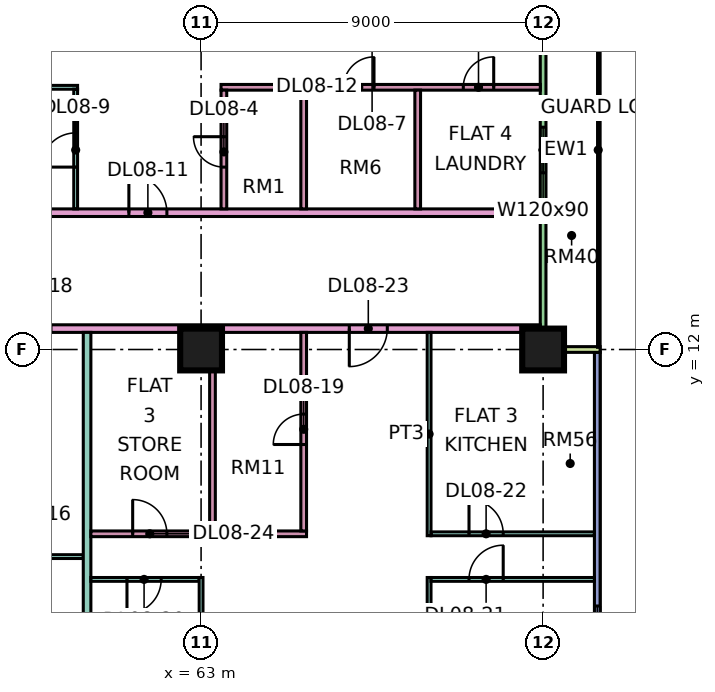
"""IFC4 building model, lengths in metres.
Left out: names, types, materials, properties, quantities, classifications, styles, units other than length and angle.
Written with IfcOpenShell. Run it as: python <this file> out.ifc"""

import sys

from ifc_helpers import new_model, si_unit, direction, frame, frame_2d, origin, origin_2d, place, context, subcontext, project, spatial, rectangle, extrude, element, fill, save


model = new_model("IFC4")
c1 = context("Model", 3, precision=1e-05, world=origin(), true_north=direction((0.0, 1.0)))
c2 = subcontext(c1, "Body", "Model", "MODEL_VIEW")
j1 = project(units=[si_unit("LENGTHUNIT", "METRE"), si_unit("PLANEANGLEUNIT", "RADIAN")], contexts=[c1])
p1 = place(None, origin())
s1 = spatial("IfcSite", under=j1, at=p1, CompositionType="ELEMENT")
p2 = place(p1, origin())
s2 = spatial("IfcBuilding", under=s1, at=p2, CompositionType="ELEMENT")
p3 = place(p2, frame((0.0, 0.0, 45.15)))
s3 = spatial("IfcBuildingStorey", under=s2, at=p3, CompositionType="ELEMENT", Elevation=45.15)
for number, where, z_axis, x_axis in (
    (1, (63.0, 12.0, 0.0), (0.0, 0.0, 1.0), (1.0, 0.0, 0.0)),
    (2, (72.0, 12.0, 0.0), (0.0, 0.0, 1.0), (1.0, 0.0, 0.0)),
):
    element("IfcColumn", number, at=place(p3, frame(where, z_axis=z_axis, x_axis=x_axis)), inside=s3, PredefinedType="COLUMN", context=c2, shape_type="SweptSolid", body=[
        extrude(rectangle(XDim=1.1, YDim=1.1, at=origin_2d()), origin(), (0.0, 0.0, 1.0), 3.75),
    ])
p4 = place(p3, frame((73.425, 1.5, 0.0), z_axis=(0.0, 0.0, 1.0), x_axis=(0.0, 1.0, 0.0)))
e3 = element("IfcWall", 3, at=p4, inside=s3, PredefinedType="SOLIDWALL", context=c2, shape_type="SweptSolid", body=[
    extrude(rectangle(XDim=10.425, YDim=0.15, at=frame_2d((5.212, 0.0))), origin(), (0.0, 0.0, 1.0), 3.35),
])
p5 = place(p4, frame((0.75, 0.0, 0.45)))
e4 = element("IfcOpeningElement", 4, at=p5, cuts=e3, PredefinedType="OPENING", context=c2, shape_type="SweptSolid", body=[
    extrude(rectangle(XDim=3.0, YDim=2.4, at=frame_2d((1.5, 1.2))), frame((0.0, 0.085, 0.0), z_axis=(0.0, -1.0, 0.0), x_axis=(1.0, 0.0, 0.0)), (0.0, 0.0, 1.0), 0.17),
])
p6 = place(p3, frame((72.0, 12.075, 0.0), z_axis=(0.0, 0.0, 1.0), x_axis=(0.0, 1.0, 0.0)))
e5 = element("IfcWall", 5, at=p6, inside=s3, PredefinedType="SOLIDWALL", context=c2, shape_type="SweptSolid", body=[
    extrude(rectangle(XDim=10.35, YDim=0.15, at=frame_2d((5.175, 0.0))), origin(), (0.0, 0.0, 1.0), 3.35),
])
p7 = place(p6, frame((4.575, 0.0, 1.7)))
e6 = element("IfcOpeningElement", 6, at=p7, cuts=e5, PredefinedType="OPENING", context=c2, shape_type="SweptSolid", body=[
    extrude(rectangle(XDim=1.2, YDim=0.9, at=frame_2d((0.6, 0.45))), frame((0.0, 0.085, 0.0), z_axis=(0.0, -1.0, 0.0), x_axis=(1.0, 0.0, 0.0)), (0.0, 0.0, 1.0), 0.17),
])
p8 = place(p6, frame((8.587, 0.0, 0.45)))
e7 = element("IfcOpeningElement", 7, at=p8, cuts=e5, PredefinedType="OPENING", context=c2, shape_type="SweptSolid", body=[
    extrude(rectangle(XDim=1.2, YDim=2.4, at=frame_2d((0.6, 1.2))), frame((0.0, 0.085, 0.0), z_axis=(0.0, -1.0, 0.0), x_axis=(1.0, 0.0, 0.0)), (0.0, 0.0, 1.0), 0.17),
])
p9 = place(p3, frame((73.5, 12.0, 0.0), z_axis=(0.0, 0.0, 1.0), x_axis=(-1.0, 0.0, 0.0)))
e8 = element("IfcWall", 8, at=p9, inside=s3, PredefinedType="SOLIDWALL", context=c2, shape_type="SweptSolid", body=[
    extrude(rectangle(XDim=1.5, YDim=0.15, at=frame_2d((0.75, 0.0))), origin(), (0.0, 0.0, 1.0), 3.35),
])
p10 = place(p3, frame((40.65, 12.55, 0.0), z_axis=(0.0, 0.0, 1.0), x_axis=(1.0, 0.0, 0.0)))
e9 = element("IfcWall", 9, at=p10, inside=s3, PredefinedType="PARTITIONING", context=c2, shape_type="SweptSolid", body=[
    extrude(rectangle(XDim=31.276, YDim=0.2, at=frame_2d((15.638, 0.0))), origin(), (0.0, 0.0, 1.0), 3.35),
])
p11 = place(p10, frame((17.4, 0.0, 0.0)))
e10 = element("IfcOpeningElement", 10, at=p11, cuts=e9, PredefinedType="OPENING", context=c2, shape_type="SweptSolid", body=[
    extrude(rectangle(XDim=1.0, YDim=2.1, at=frame_2d((0.5, 1.05))), frame((0.0, 0.11, 0.0), z_axis=(0.0, -1.0, 0.0), x_axis=(1.0, 0.0, 0.0)), (0.0, 0.0, 1.0), 0.22),
])
p12 = place(p10, frame((26.25, 0.0, 0.0)))
e11 = element("IfcOpeningElement", 11, at=p12, cuts=e9, PredefinedType="OPENING", context=c2, shape_type="SweptSolid", body=[
    extrude(rectangle(XDim=1.0, YDim=2.1, at=frame_2d((0.5, 1.05))), frame((0.0, 0.11, 0.0), z_axis=(0.0, -1.0, 0.0), x_axis=(1.0, 0.0, 0.0)), (0.0, 0.0, 1.0), 0.22),
])
p13 = place(p10, frame((1.05, 0.0, 0.0)))
e12 = element("IfcOpeningElement", 12, at=p13, cuts=e9, PredefinedType="OPENING", context=c2, shape_type="SweptSolid", body=[
    extrude(rectangle(XDim=1.0, YDim=2.1, at=frame_2d((0.5, 1.05))), frame((0.0, 0.11, 0.0), z_axis=(0.0, -1.0, 0.0), x_axis=(1.0, 0.0, 0.0)), (0.0, 0.0, 1.0), 0.22),
])
p14 = place(p3, frame((51.225, 15.6, 0.0), z_axis=(0.0, 0.0, 1.0), x_axis=(1.0, 0.0, 0.0)))
e13 = element("IfcWall", 13, at=p14, inside=s3, PredefinedType="PARTITIONING", context=c2, shape_type="SweptSolid", body=[
    extrude(rectangle(XDim=20.701, YDim=0.2, at=frame_2d((10.351, 0.0))), origin(), (0.0, 0.0, 1.0), 3.35),
])
p15 = place(p14, frame((9.875, 0.0, 0.0)))
e14 = element("IfcOpeningElement", 14, at=p15, cuts=e13, PredefinedType="OPENING", context=c2, shape_type="SweptSolid", body=[
    extrude(rectangle(XDim=1.0, YDim=2.1, at=frame_2d((0.5, 1.05))), frame((0.0, 0.11, 0.0), z_axis=(0.0, -1.0, 0.0), x_axis=(1.0, 0.0, 0.0)), (0.0, 0.0, 1.0), 0.22),
])
p16 = place(p14, frame((0.875, 0.0, 0.0)))
e15 = element("IfcOpeningElement", 15, at=p16, cuts=e13, PredefinedType="OPENING", context=c2, shape_type="SweptSolid", body=[
    extrude(rectangle(XDim=1.0, YDim=2.1, at=frame_2d((0.5, 1.05))), frame((0.0, 0.11, 0.0), z_axis=(0.0, -1.0, 0.0), x_axis=(1.0, 0.0, 0.0)), (0.0, 0.0, 1.0), 0.22),
])
p17 = place(p3, frame((54.05, 6.55, 0.0), z_axis=(0.0, 0.0, 1.0), x_axis=(1.0, 0.0, 0.0)))
e16 = element("IfcWall", 16, at=p17, inside=s3, PredefinedType="PARTITIONING", context=c2, shape_type="SweptSolid", body=[
    extrude(rectangle(XDim=5.85, YDim=0.1, at=frame_2d((2.925, 0.0))), origin(), (0.0, 0.0, 1.0), 3.35),
])
p18 = place(p17, frame((1.0, 0.0, 0.0)))
e17 = element("IfcOpeningElement", 17, at=p18, cuts=e16, PredefinedType="OPENING", context=c2, shape_type="SweptSolid", body=[
    extrude(rectangle(XDim=0.9, YDim=2.1, at=frame_2d((0.45, 1.05))), frame((0.0, 0.06, 0.0), z_axis=(0.0, -1.0, 0.0), x_axis=(1.0, 0.0, 0.0)), (0.0, 0.0, 1.0), 0.12),
])
p19 = place(p17, frame((4.0, 0.0, 0.0)))
e18 = element("IfcOpeningElement", 18, at=p19, cuts=e16, PredefinedType="OPENING", context=c2, shape_type="SweptSolid", body=[
    extrude(rectangle(XDim=0.9, YDim=2.1, at=frame_2d((0.45, 1.05))), frame((0.0, 0.06, 0.0), z_axis=(0.0, -1.0, 0.0), x_axis=(1.0, 0.0, 0.0)), (0.0, 0.0, 1.0), 0.12),
])
p20 = place(p3, frame((54.1, 18.9, 0.0), z_axis=(0.0, 0.0, 1.0), x_axis=(1.0, 0.0, 0.0)))
e19 = element("IfcWall", 19, at=p20, inside=s3, PredefinedType="PARTITIONING", context=c2, shape_type="SweptSolid", body=[
    extrude(rectangle(XDim=5.65, YDim=0.1, at=frame_2d((2.825, 0.0))), origin(), (0.0, 0.0, 1.0), 3.35),
])
p21 = place(p3, frame((59.7, 15.7, 0.0), z_axis=(0.0, 0.0, 1.0), x_axis=(0.0, 1.0, 0.0)))
e20 = element("IfcWall", 20, at=p21, inside=s3, PredefinedType="PARTITIONING", context=c2, shape_type="SweptSolid", body=[
    extrude(rectangle(XDim=3.15, YDim=0.1, at=frame_2d((1.575, 0.0))), origin(), (0.0, 0.0, 1.0), 3.35),
])
p22 = place(p21, frame((1.1, 0.0, 0.0)))
e21 = element("IfcOpeningElement", 21, at=p22, cuts=e20, PredefinedType="OPENING", context=c2, shape_type="SweptSolid", body=[
    extrude(rectangle(XDim=0.9, YDim=2.1, at=frame_2d((0.45, 1.05))), frame((0.0, 0.06, 0.0), z_axis=(0.0, -1.0, 0.0), x_axis=(1.0, 0.0, 0.0)), (0.0, 0.0, 1.0), 0.12),
])
p23 = place(p3, frame((60.0, 0.0, 0.0), z_axis=(0.0, 0.0, 1.0), x_axis=(0.0, 1.0, 0.0)))
e22 = element("IfcWall", 22, at=p23, inside=s3, PredefinedType="PARTITIONING", context=c2, shape_type="SweptSolid", body=[
    extrude(rectangle(XDim=12.45, YDim=0.2, at=frame_2d((6.225, 0.0))), origin(), (0.0, 0.0, 1.0), 3.35),
])
p24 = place(p3, frame((60.1, 5.95, 0.0), z_axis=(0.0, 0.0, 1.0), x_axis=(1.0, 0.0, 0.0)))
e23 = element("IfcWall", 23, at=p24, inside=s3, PredefinedType="PARTITIONING", context=c2, shape_type="SweptSolid", body=[
    extrude(rectangle(XDim=2.85, YDim=0.1, at=frame_2d((1.425, 0.0))), origin(), (0.0, 0.0, 1.0), 3.35),
])
p25 = place(p24, frame((0.95, 0.0, 0.0)))
e24 = element("IfcOpeningElement", 24, at=p25, cuts=e23, PredefinedType="OPENING", context=c2, shape_type="SweptSolid", body=[
    extrude(rectangle(XDim=0.9, YDim=2.1, at=frame_2d((0.45, 1.05))), frame((0.0, 0.06, 0.0), z_axis=(0.0, -1.0, 0.0), x_axis=(1.0, 0.0, 0.0)), (0.0, 0.0, 1.0), 0.12),
])
p26 = place(p3, frame((60.1, 7.15, 0.0), z_axis=(0.0, 0.0, 1.0), x_axis=(1.0, 0.0, 0.0)))
e25 = element("IfcWall", 25, at=p26, inside=s3, PredefinedType="PARTITIONING", context=c2, shape_type="SweptSolid", body=[
    extrude(rectangle(XDim=5.675, YDim=0.15, at=frame_2d((2.837, 0.0))), origin(), (0.0, 0.0, 1.0), 3.35),
])
p27 = place(p26, frame((1.1, 0.0, 0.0)))
e26 = element("IfcOpeningElement", 26, at=p27, cuts=e25, PredefinedType="OPENING", context=c2, shape_type="SweptSolid", body=[
    extrude(rectangle(XDim=0.9, YDim=2.1, at=frame_2d((0.45, 1.05))), frame((0.0, 0.085, 0.0), z_axis=(0.0, -1.0, 0.0), x_axis=(1.0, 0.0, 0.0)), (0.0, 0.0, 1.0), 0.17),
])
p28 = place(p3, frame((63.0, 0.074, 0.0), z_axis=(0.0, 0.0, 1.0), x_axis=(0.0, 1.0, 0.0)))
e27 = element("IfcWall", 27, at=p28, inside=s3, PredefinedType="PARTITIONING", context=c2, shape_type="SweptSolid", body=[
    extrude(rectangle(XDim=5.926, YDim=0.1, at=frame_2d((2.963, 0.0))), origin(), (0.0, 0.0, 1.0), 3.35),
])
p29 = place(p3, frame((63.3, 7.225, 0.0), z_axis=(0.0, 0.0, 1.0), x_axis=(0.0, 1.0, 0.0)))
e28 = element("IfcWall", 28, at=p29, inside=s3, PredefinedType="PARTITIONING", context=c2, shape_type="SweptSolid", body=[
    extrude(rectangle(XDim=5.225, YDim=0.15, at=frame_2d((2.612, 0.0))), origin(), (0.0, 0.0, 1.0), 3.35),
])
p30 = place(p3, frame((63.525, 18.9, 0.0), z_axis=(0.0, 0.0, 1.0), x_axis=(1.0, 0.0, 0.0)))
e29 = element("IfcWall", 29, at=p30, inside=s3, PredefinedType="PARTITIONING", context=c2, shape_type="SweptSolid", body=[
    extrude(rectangle(XDim=8.401, YDim=0.15, at=frame_2d((4.201, 0.0))), origin(), (0.0, 0.0, 1.0), 3.35),
])
p31 = place(p30, frame((6.375, 0.0, 0.0)))
e30 = element("IfcOpeningElement", 30, at=p31, cuts=e29, PredefinedType="OPENING", context=c2, shape_type="SweptSolid", body=[
    extrude(rectangle(XDim=0.8, YDim=2.1, at=frame_2d((0.4, 1.05))), frame((0.0, 0.085, 0.0), z_axis=(0.0, -1.0, 0.0), x_axis=(1.0, 0.0, 0.0)), (0.0, 0.0, 1.0), 0.17),
])
p32 = place(p30, frame((3.225, 0.0, 0.0)))
e31 = element("IfcOpeningElement", 31, at=p32, cuts=e29, PredefinedType="OPENING", context=c2, shape_type="SweptSolid", body=[
    extrude(rectangle(XDim=0.8, YDim=2.1, at=frame_2d((0.4, 1.05))), frame((0.0, 0.085, 0.0), z_axis=(0.0, -1.0, 0.0), x_axis=(1.0, 0.0, 0.0)), (0.0, 0.0, 1.0), 0.17),
])
p33 = place(p3, frame((63.6, 15.7, 0.0), z_axis=(0.0, 0.0, 1.0), x_axis=(0.0, 1.0, 0.0)))
e32 = element("IfcWall", 32, at=p33, inside=s3, PredefinedType="PARTITIONING", context=c2, shape_type="SweptSolid", body=[
    extrude(rectangle(XDim=3.125, YDim=0.15, at=frame_2d((1.562, 0.0))), origin(), (0.0, 0.0, 1.0), 3.35),
])
p34 = place(p33, frame((1.1, 0.0, 0.0)))
e33 = element("IfcOpeningElement", 33, at=p34, cuts=e32, PredefinedType="OPENING", context=c2, shape_type="SweptSolid", body=[
    extrude(rectangle(XDim=0.8, YDim=2.1, at=frame_2d((0.4, 1.05))), frame((0.0, 0.085, 0.0), z_axis=(0.0, -1.0, 0.0), x_axis=(1.0, 0.0, 0.0)), (0.0, 0.0, 1.0), 0.17),
])
p35 = place(p3, frame((65.7, 7.225, 0.0), z_axis=(0.0, 0.0, 1.0), x_axis=(0.0, 1.0, 0.0)))
e34 = element("IfcWall", 34, at=p35, inside=s3, PredefinedType="PARTITIONING", context=c2, shape_type="SweptSolid", body=[
    extrude(rectangle(XDim=5.225, YDim=0.15, at=frame_2d((2.612, 0.0))), origin(), (0.0, 0.0, 1.0), 3.35),
])
p36 = place(p35, frame((2.275, 0.0, 0.0)))
e35 = element("IfcOpeningElement", 35, at=p36, cuts=e34, PredefinedType="OPENING", context=c2, shape_type="SweptSolid", body=[
    extrude(rectangle(XDim=0.8, YDim=2.1, at=frame_2d((0.4, 1.05))), frame((0.0, 0.085, 0.0), z_axis=(0.0, -1.0, 0.0), x_axis=(1.0, 0.0, 0.0)), (0.0, 0.0, 1.0), 0.17),
])
for number, where, z_axis, x_axis in (
    (36, (65.7, 15.7, 0.0), (0.0, 0.0, 1.0), (0.0, 1.0, 0.0)),
    (37, (68.7, 15.7, 0.0), (0.0, 0.0, 1.0), (0.0, 1.0, 0.0)),
):
    element("IfcWall", number, at=place(p3, frame(where, z_axis=z_axis, x_axis=x_axis)), inside=s3, PredefinedType="PARTITIONING", context=c2, shape_type="SweptSolid", body=[
        extrude(rectangle(XDim=3.125, YDim=0.15, at=frame_2d((1.562, 0.0))), origin(), (0.0, 0.0, 1.0), 3.35),
    ])
p37 = place(p3, frame((69.0, 0.074, 0.0), z_axis=(0.0, 0.0, 1.0), x_axis=(0.0, 1.0, 0.0)))
e38 = element("IfcWall", 38, at=p37, inside=s3, PredefinedType="PARTITIONING", context=c2, shape_type="SweptSolid", body=[
    extrude(rectangle(XDim=5.926, YDim=0.1, at=frame_2d((2.963, 0.0))), origin(), (0.0, 0.0, 1.0), 3.35),
])
p38 = place(p3, frame((69.0, 7.1, 0.0), z_axis=(0.0, 0.0, 1.0), x_axis=(0.0, 1.0, 0.0)))
e39 = element("IfcWall", 39, at=p38, inside=s3, PredefinedType="PARTITIONING", context=c2, shape_type="SweptSolid", body=[
    extrude(rectangle(XDim=5.35, YDim=0.1, at=frame_2d((2.675, 0.0))), origin(), (0.0, 0.0, 1.0), 3.35),
])
p39 = place(p3, frame((69.05, 5.95, 0.0), z_axis=(0.0, 0.0, 1.0), x_axis=(1.0, 0.0, 0.0)))
e40 = element("IfcWall", 40, at=p39, inside=s3, PredefinedType="PARTITIONING", context=c2, shape_type="SweptSolid", body=[
    extrude(rectangle(XDim=4.3, YDim=0.1, at=frame_2d((2.15, 0.0))), origin(), (0.0, 0.0, 1.0), 3.35),
])
p40 = place(p39, frame((1.0, 0.0, 0.0)))
e41 = element("IfcOpeningElement", 41, at=p40, cuts=e40, PredefinedType="OPENING", context=c2, shape_type="SweptSolid", body=[
    extrude(rectangle(XDim=0.9, YDim=2.1, at=frame_2d((0.45, 1.05))), frame((0.0, 0.06, 0.0), z_axis=(0.0, -1.0, 0.0), x_axis=(1.0, 0.0, 0.0)), (0.0, 0.0, 1.0), 0.12),
])
p41 = place(p3, frame((69.05, 7.15, 0.0), z_axis=(0.0, 0.0, 1.0), x_axis=(1.0, 0.0, 0.0)))
e42 = element("IfcWall", 42, at=p41, inside=s3, PredefinedType="PARTITIONING", context=c2, shape_type="SweptSolid", body=[
    extrude(rectangle(XDim=4.3, YDim=0.1, at=frame_2d((2.15, 0.0))), origin(), (0.0, 0.0, 1.0), 3.35),
])
p42 = place(p41, frame((1.0, 0.0, 0.0)))
e43 = element("IfcOpeningElement", 43, at=p42, cuts=e42, PredefinedType="OPENING", context=c2, shape_type="SweptSolid", body=[
    extrude(rectangle(XDim=0.9, YDim=2.1, at=frame_2d((0.45, 1.05))), frame((0.0, 0.06, 0.0), z_axis=(0.0, -1.0, 0.0), x_axis=(1.0, 0.0, 0.0)), (0.0, 0.0, 1.0), 0.12),
])
p43 = place(p5, origin())
e44 = element("IfcWindow", 44, at=p43, inside=s3, PartitioningType="SINGLE_PANEL", PredefinedType="WINDOW", context=c2, shape_type="SweptSolid", body=[
    extrude(rectangle(XDim=3.0, YDim=2.4, at=frame_2d((1.5, 1.2))), frame((0.0, 0.03, 0.0), z_axis=(0.0, -1.0, 0.0), x_axis=(1.0, 0.0, 0.0)), (0.0, 0.0, 1.0), 0.06),
])
fill(e4, e44)
p44 = place(p7, origin())
e45 = element("IfcWindow", 45, at=p44, inside=s3, PartitioningType="SINGLE_PANEL", PredefinedType="WINDOW", context=c2, shape_type="SweptSolid", body=[
    extrude(rectangle(XDim=1.2, YDim=0.9, at=frame_2d((0.6, 0.45))), frame((0.0, 0.03, 0.0), z_axis=(0.0, -1.0, 0.0), x_axis=(1.0, 0.0, 0.0)), (0.0, 0.0, 1.0), 0.06),
])
fill(e6, e45)
p45 = place(p34, frame((0.8, 0.0, 0.0), z_axis=(0.0, 0.0, 1.0), x_axis=(-1.0, 0.0, 0.0)))
e46 = element("IfcDoor", 46, at=p45, inside=s3, OperationType="SINGLE_SWING_RIGHT", PredefinedType="DOOR", context=c2, shape_type="SweptSolid", body=[
    extrude(rectangle(XDim=0.8, YDim=2.1, at=frame_2d((0.4, 1.05))), frame((0.0, 0.025, 0.0), z_axis=(0.0, -1.0, 0.0), x_axis=(1.0, 0.0, 0.0)), (0.0, 0.0, 1.0), 0.05),
])
fill(e33, e46)
p46 = place(p22, origin())
e47 = element("IfcDoor", 47, at=p46, inside=s3, OperationType="SINGLE_SWING_LEFT", PredefinedType="DOOR", context=c2, shape_type="SweptSolid", body=[
    extrude(rectangle(XDim=0.9, YDim=2.1, at=frame_2d((0.45, 1.05))), frame((0.0, 0.025, 0.0), z_axis=(0.0, -1.0, 0.0), x_axis=(1.0, 0.0, 0.0)), (0.0, 0.0, 1.0), 0.05),
])
fill(e21, e47)
p47 = place(p31, frame((0.8, 0.0, 0.0), z_axis=(0.0, 0.0, 1.0), x_axis=(-1.0, 0.0, 0.0)))
e48 = element("IfcDoor", 48, at=p47, inside=s3, OperationType="SINGLE_SWING_RIGHT", PredefinedType="DOOR", context=c2, shape_type="SweptSolid", body=[
    extrude(rectangle(XDim=0.8, YDim=2.1, at=frame_2d((0.4, 1.05))), frame((0.0, 0.025, 0.0), z_axis=(0.0, -1.0, 0.0), x_axis=(1.0, 0.0, 0.0)), (0.0, 0.0, 1.0), 0.05),
])
fill(e30, e48)
p48 = place(p15, origin())
e49 = element("IfcDoor", 49, at=p48, inside=s3, OperationType="SINGLE_SWING_LEFT", PredefinedType="DOOR", context=c2, shape_type="SweptSolid", body=[
    extrude(rectangle(XDim=1.0, YDim=2.1, at=frame_2d((0.5, 1.05))), frame((0.0, 0.025, 0.0), z_axis=(0.0, -1.0, 0.0), x_axis=(1.0, 0.0, 0.0)), (0.0, 0.0, 1.0), 0.05),
])
fill(e14, e49)
p49 = place(p32, frame((0.8, 0.0, 0.0), z_axis=(0.0, 0.0, 1.0), x_axis=(-1.0, 0.0, 0.0)))
e50 = element("IfcDoor", 50, at=p49, inside=s3, OperationType="SINGLE_SWING_RIGHT", PredefinedType="DOOR", context=c2, shape_type="SweptSolid", body=[
    extrude(rectangle(XDim=0.8, YDim=2.1, at=frame_2d((0.4, 1.05))), frame((0.0, 0.025, 0.0), z_axis=(0.0, -1.0, 0.0), x_axis=(1.0, 0.0, 0.0)), (0.0, 0.0, 1.0), 0.05),
])
fill(e31, e50)
p50 = place(p36, origin())
e51 = element("IfcDoor", 51, at=p50, inside=s3, OperationType="SINGLE_SWING_LEFT", PredefinedType="DOOR", context=c2, shape_type="SweptSolid", body=[
    extrude(rectangle(XDim=0.8, YDim=2.1, at=frame_2d((0.4, 1.05))), frame((0.0, 0.025, 0.0), z_axis=(0.0, -1.0, 0.0), x_axis=(1.0, 0.0, 0.0)), (0.0, 0.0, 1.0), 0.05),
])
fill(e35, e51)
p51 = place(p25, frame((0.9, 0.0, 0.0), z_axis=(0.0, 0.0, 1.0), x_axis=(-1.0, 0.0, 0.0)))
e52 = element("IfcDoor", 52, at=p51, inside=s3, OperationType="SINGLE_SWING_LEFT", PredefinedType="DOOR", context=c2, shape_type="SweptSolid", body=[
    extrude(rectangle(XDim=0.9, YDim=2.1, at=frame_2d((0.45, 1.05))), frame((0.0, 0.025, 0.0), z_axis=(0.0, -1.0, 0.0), x_axis=(1.0, 0.0, 0.0)), (0.0, 0.0, 1.0), 0.05),
])
fill(e24, e52)
p52 = place(p40, frame((0.9, 0.0, 0.0), z_axis=(0.0, 0.0, 1.0), x_axis=(-1.0, 0.0, 0.0)))
e53 = element("IfcDoor", 53, at=p52, inside=s3, OperationType="SINGLE_SWING_RIGHT", PredefinedType="DOOR", context=c2, shape_type="SweptSolid", body=[
    extrude(rectangle(XDim=0.9, YDim=2.1, at=frame_2d((0.45, 1.05))), frame((0.0, 0.025, 0.0), z_axis=(0.0, -1.0, 0.0), x_axis=(1.0, 0.0, 0.0)), (0.0, 0.0, 1.0), 0.05),
])
fill(e41, e53)
p53 = place(p42, origin())
e54 = element("IfcDoor", 54, at=p53, inside=s3, OperationType="SINGLE_SWING_LEFT", PredefinedType="DOOR", context=c2, shape_type="SweptSolid", body=[
    extrude(rectangle(XDim=0.9, YDim=2.1, at=frame_2d((0.45, 1.05))), frame((0.0, 0.025, 0.0), z_axis=(0.0, -1.0, 0.0), x_axis=(1.0, 0.0, 0.0)), (0.0, 0.0, 1.0), 0.05),
])
fill(e43, e54)
p54 = place(p12, frame((1.0, 0.0, 0.0), z_axis=(0.0, 0.0, 1.0), x_axis=(-1.0, 0.0, 0.0)))
e55 = element("IfcDoor", 55, at=p54, inside=s3, OperationType="SINGLE_SWING_LEFT", PredefinedType="DOOR", context=c2, shape_type="SweptSolid", body=[
    extrude(rectangle(XDim=1.0, YDim=2.1, at=frame_2d((0.5, 1.05))), frame((0.0, 0.025, 0.0), z_axis=(0.0, -1.0, 0.0), x_axis=(1.0, 0.0, 0.0)), (0.0, 0.0, 1.0), 0.05),
])
fill(e11, e55)
p55 = place(p27, origin())
e56 = element("IfcDoor", 56, at=p55, inside=s3, OperationType="SINGLE_SWING_LEFT", PredefinedType="DOOR", context=c2, shape_type="SweptSolid", body=[
    extrude(rectangle(XDim=0.9, YDim=2.1, at=frame_2d((0.45, 1.05))), frame((0.0, 0.025, 0.0), z_axis=(0.0, -1.0, 0.0), x_axis=(1.0, 0.0, 0.0)), (0.0, 0.0, 1.0), 0.05),
])
fill(e26, e56)
save(model, sys.argv[1])
